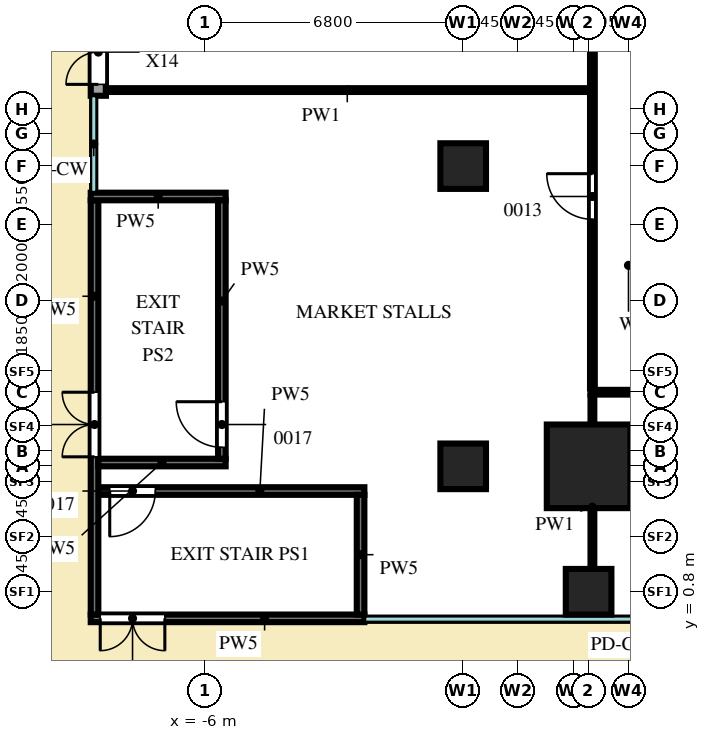
"""IFC4 building model, lengths in metres.
Left out: names, types, materials, properties, quantities, classifications, styles, units other than length and angle.
Written with IfcOpenShell. Run it as: python <this file> out.ifc"""

import sys

from ifc_helpers import new_model, si_unit, direction, frame, frame_2d, origin, origin_2d, place, context, subcontext, project, spatial, rectangle, extrude, source, transform, mapped, element, fill, save


model = new_model("IFC4")
c1 = context("Model", 3, precision=1e-05, world=origin(), true_north=direction((0.0, 1.0)))
c2 = subcontext(c1, "Body", "Model", "MODEL_VIEW")
j1 = project(units=[si_unit("LENGTHUNIT", "METRE"), si_unit("PLANEANGLEUNIT", "RADIAN")], contexts=[c1])
p1 = place(None, origin())
s1 = spatial("IfcSite", under=j1, at=p1, CompositionType="ELEMENT")
p2 = place(p1, origin())
s2 = spatial("IfcBuilding", under=s1, at=p2, CompositionType="ELEMENT")
p3 = place(p2, origin())
s3 = spatial("IfcBuildingStorey", under=s2, at=p3, CompositionType="ELEMENT", Elevation=0.0)
m1 = source(origin(), c2, "Body", "SweptSolid", [
    extrude(rectangle(XDim=2.2, YDim=2.2, at=origin_2d()), origin(), (0.0, 0.0, 1.0), 7.2),
])
p4 = place(p3, frame((4.1, 4.1, 0.0), z_axis=(0.0, 0.0, 1.0), x_axis=(1.0, 0.0, 0.0)))
e1 = element("IfcColumn", 1, at=p4, inside=s3, PredefinedType="COLUMN", context=c2, shape_type="MappedRepresentation", body=[
    mapped(m1, transform((0.0, 0.0, 0.0))),
])
m2 = source(origin(), c2, "Body", "SweptSolid", [
    extrude(rectangle(XDim=1.2, YDim=1.2, at=origin_2d()), origin(), (0.0, 0.0, 1.0), 7.2),
])
for number, where, z_axis, x_axis in (
    (2, (4.1, 0.8, 0.0), (0.0, 0.0, 1.0), (1.0, 0.0, 0.0)),
    (3, (0.8, 4.1, 0.0), (0.0, 0.0, 1.0), (1.0, 0.0, 0.0)),
    (4, (0.8, 12.0, 0.0), (0.0, 0.0, 1.0), (1.0, 0.0, 0.0)),
):
    element("IfcColumn", number, at=place(p3, frame(where, z_axis=z_axis, x_axis=x_axis)), inside=s3, PredefinedType="COLUMN", context=c2, shape_type="MappedRepresentation", body=[
        mapped(m2, transform((0.0, 0.0, 0.0))),
    ])
m3 = source(origin(), c2, "Body", "SweptSolid", [
    extrude(rectangle(XDim=2.3, YDim=0.4, at=frame_2d((1.15, 0.0))), origin(), (0.0, 0.0, 1.0), 7.15),
])
p5 = place(p3, frame((-8.8, 16.15, 0.0), z_axis=(0.0, 0.0, 1.0), x_axis=(0.0, -1.0, 0.0)))
e5 = element("IfcWall", 5, at=p5, inside=s3, PredefinedType="SOLIDWALL", context=c2, shape_type="MappedRepresentation", body=[
    mapped(m3, transform((0.0, 0.0, 0.0))),
])
m4 = source(origin(), c2, "Body", "SweptSolid", [
    extrude(rectangle(XDim=1.7, YDim=2.4, at=frame_2d((0.85, 1.2))), frame((0.0, 0.21, 0.0), z_axis=(0.0, -1.0, 0.0), x_axis=(1.0, 0.0, 0.0)), (0.0, 0.0, 1.0), 0.42),
])
p6 = place(p5, frame((2.0, 0.0, 0.0), z_axis=(0.0, 0.0, 1.0), x_axis=(-1.0, 0.0, 0.0)))
e6 = element("IfcOpeningElement", 6, at=p6, cuts=e5, PredefinedType="OPENING", context=c2, shape_type="MappedRepresentation", body=[
    mapped(m4, transform((0.0, 0.0, 0.0))),
])
m5 = source(origin(), c2, "Body", "SweptSolid", [
    extrude(rectangle(XDim=7.2, YDim=0.2, at=frame_2d((3.6, 0.0))), origin(), (0.0, 0.0, 1.0), 7.2),
])
p7 = place(p3, frame((-9.0, 0.1, 0.0), z_axis=(0.0, 0.0, 1.0), x_axis=(1.0, 0.0, 0.0)))
e7 = element("IfcWall", 7, at=p7, inside=s3, PredefinedType="PARTITIONING", context=c2, shape_type="MappedRepresentation", body=[
    mapped(m5, transform((0.0, 0.0, 0.0))),
])
m6 = source(origin(), c2, "Body", "SweptSolid", [
    extrude(rectangle(XDim=1.7, YDim=2.4, at=frame_2d((0.85, 1.2))), frame((0.0, 0.11, 0.0), z_axis=(0.0, -1.0, 0.0), x_axis=(1.0, 0.0, 0.0)), (0.0, 0.0, 1.0), 0.22),
])
p8 = place(p7, frame((1.95, 0.0, 0.0), z_axis=(0.0, 0.0, 1.0), x_axis=(-1.0, 0.0, 0.0)))
e8 = element("IfcOpeningElement", 8, at=p8, cuts=e7, PredefinedType="OPENING", context=c2, shape_type="MappedRepresentation", body=[
    mapped(m6, transform((0.0, 0.0, 0.0))),
])
m7 = source(origin(), c2, "Body", "SweptSolid", [
    extrude(rectangle(XDim=7.0, YDim=0.2, at=frame_2d((3.5, 0.0))), origin(), (0.0, 0.0, 1.0), 7.2),
])
p9 = place(p3, frame((-8.8, 3.45, 0.0), z_axis=(0.0, 0.0, 1.0), x_axis=(1.0, 0.0, 0.0)))
e9 = element("IfcWall", 9, at=p9, inside=s3, PredefinedType="PARTITIONING", context=c2, shape_type="MappedRepresentation", body=[
    mapped(m7, transform((0.0, 0.0, 0.0))),
])
m8 = source(origin(), c2, "Body", "SweptSolid", [
    extrude(rectangle(XDim=1.2, YDim=2.1, at=frame_2d((0.6, 1.05))), frame((0.0, 0.11, 0.0), z_axis=(0.0, -1.0, 0.0), x_axis=(1.0, 0.0, 0.0)), (0.0, 0.0, 1.0), 0.22),
])
p10 = place(p9, frame((0.3, 0.0, 0.0)))
e10 = element("IfcOpeningElement", 10, at=p10, cuts=e9, PredefinedType="OPENING", context=c2, shape_type="MappedRepresentation", body=[
    mapped(m8, transform((0.0, 0.0, 0.0))),
])
m9 = source(origin(), c2, "Body", "SweptSolid", [
    extrude(rectangle(XDim=10.9, YDim=0.2, at=frame_2d((5.45, 0.0))), origin(), (0.0, 0.0, 1.0), 7.2),
])
p11 = place(p3, frame((-8.9, 0.2, 0.0), z_axis=(0.0, 0.0, 1.0), x_axis=(0.0, 1.0, 0.0)))
e11 = element("IfcWall", 11, at=p11, inside=s3, PredefinedType="PARTITIONING", context=c2, shape_type="MappedRepresentation", body=[
    mapped(m9, transform((0.0, 0.0, 0.0))),
])
p12 = place(p11, frame((4.15, 0.0, 0.0)))
e12 = element("IfcOpeningElement", 12, at=p12, cuts=e11, PredefinedType="OPENING", context=c2, shape_type="MappedRepresentation", body=[
    mapped(m6, transform((0.0, 0.0, 0.0))),
])
m10 = source(origin(), c2, "Body", "SweptSolid", [
    extrude(rectangle(XDim=3.15, YDim=0.2, at=frame_2d((1.575, 0.0))), origin(), (0.0, 0.0, 1.0), 7.2),
])
p13 = place(p3, frame((-1.9, 0.2, 0.0), z_axis=(0.0, 0.0, 1.0), x_axis=(0.0, 1.0, 0.0)))
e13 = element("IfcWall", 13, at=p13, inside=s3, PredefinedType="PARTITIONING", context=c2, shape_type="MappedRepresentation", body=[
    mapped(m10, transform((0.0, 0.0, 0.0))),
])
m11 = source(origin(), c2, "Body", "SweptSolid", [
    extrude(rectangle(XDim=3.35, YDim=0.2, at=frame_2d((1.675, 0.0))), origin(), (0.0, 0.0, 1.0), 7.2),
])
p14 = place(p3, frame((-8.8, 4.2, 0.0), z_axis=(0.0, 0.0, 1.0), x_axis=(1.0, 0.0, 0.0)))
e14 = element("IfcWall", 14, at=p14, inside=s3, PredefinedType="PARTITIONING", context=c2, shape_type="MappedRepresentation", body=[
    mapped(m11, transform((0.0, 0.0, 0.0))),
])
m12 = source(origin(), c2, "Body", "SweptSolid", [
    extrude(rectangle(XDim=3.55, YDim=0.2, at=frame_2d((1.775, 0.0))), origin(), (0.0, 0.0, 1.0), 7.2),
])
p15 = place(p3, frame((-9.0, 11.2, 0.0), z_axis=(0.0, 0.0, 1.0), x_axis=(1.0, 0.0, 0.0)))
e15 = element("IfcWall", 15, at=p15, inside=s3, PredefinedType="PARTITIONING", context=c2, shape_type="MappedRepresentation", body=[
    mapped(m12, transform((0.0, 0.0, 0.0))),
])
m13 = source(origin(), c2, "Body", "SweptSolid", [
    extrude(rectangle(XDim=6.8, YDim=0.2, at=frame_2d((3.4, 0.0))), origin(), (0.0, 0.0, 1.0), 7.2),
])
p16 = place(p3, frame((-5.55, 4.3, 0.0), z_axis=(0.0, 0.0, 1.0), x_axis=(0.0, 1.0, 0.0)))
e16 = element("IfcWall", 16, at=p16, inside=s3, PredefinedType="PARTITIONING", context=c2, shape_type="MappedRepresentation", body=[
    mapped(m13, transform((0.0, 0.0, 0.0))),
])
p17 = place(p16, frame((0.3, 0.0, 0.0)))
e17 = element("IfcOpeningElement", 17, at=p17, cuts=e16, PredefinedType="OPENING", context=c2, shape_type="MappedRepresentation", body=[
    mapped(m8, transform((0.0, 0.0, 0.0))),
])
m14 = source(origin(), c2, "Body", "SweptSolid", [
    extrude(rectangle(XDim=5.85, YDim=0.1, at=frame_2d((2.925, 0.0))), origin(), (0.0, 0.0, 1.0), 7.2),
])
p18 = place(p3, frame((4.2, 0.1, 0.0), z_axis=(0.0, 0.0, 1.0), x_axis=(0.0, 1.0, 0.0)))
e18 = element("IfcWall", 18, at=p18, inside=s3, PredefinedType="PARTITIONING", context=c2, shape_type="MappedRepresentation", body=[
    mapped(m14, transform((0.0, 0.0, 0.0))),
])
m15 = source(origin(), c2, "Body", "SweptSolid", [
    extrude(rectangle(XDim=9.55, YDim=0.125, at=frame_2d((4.775, 0.0))), origin(), (0.0, 0.0, 1.0), 7.2),
])
p19 = place(p3, frame((4.15, 6.05, 0.0), z_axis=(0.0, 0.0, 1.0), x_axis=(1.0, 0.0, 0.0)))
e19 = element("IfcWall", 19, at=p19, inside=s3, PredefinedType="PARTITIONING", context=c2, shape_type="MappedRepresentation", body=[
    mapped(m15, transform((0.0, 0.0, 0.0))),
])
m16 = source(origin(), c2, "Body", "SweptSolid", [
    extrude(rectangle(XDim=0.9, YDim=2.1, at=frame_2d((0.45, 1.05))), frame((0.0, 0.073, 0.0), z_axis=(0.0, -1.0, 0.0), x_axis=(1.0, 0.0, 0.0)), (0.0, 0.0, 1.0), 0.145),
])
p20 = place(p19, frame((4.25, 0.0, 0.0)))
e20 = element("IfcOpeningElement", 20, at=p20, cuts=e19, PredefinedType="OPENING", context=c2, shape_type="MappedRepresentation", body=[
    mapped(m16, transform((0.0, 0.0, 0.0))),
])
m17 = source(origin(), c2, "Body", "SweptSolid", [
    extrude(rectangle(XDim=41.8, YDim=0.125, at=frame_2d((20.9, 0.0))), origin(), (0.0, 0.0, 1.0), 7.2),
])
p21 = place(p3, frame((4.2, 6.15, 0.0), z_axis=(0.0, 0.0, 1.0), x_axis=(0.0, 1.0, 0.0)))
e21 = element("IfcWall", 21, at=p21, inside=s3, PredefinedType="PARTITIONING", context=c2, shape_type="MappedRepresentation", body=[
    mapped(m17, transform((0.0, 0.0, 0.0))),
])
m18 = source(origin(), c2, "Body", "SweptSolid", [
    extrude(rectangle(XDim=1.2, YDim=2.1, at=frame_2d((0.6, 1.05))), frame((0.0, 0.073, 0.0), z_axis=(0.0, -1.0, 0.0), x_axis=(1.0, 0.0, 0.0)), (0.0, 0.0, 1.0), 0.145),
])
p22 = place(p21, frame((4.45, 0.0, 0.0)))
e22 = element("IfcOpeningElement", 22, at=p22, cuts=e21, PredefinedType="OPENING", context=c2, shape_type="MappedRepresentation", body=[
    mapped(m18, transform((0.0, 0.0, 0.0))),
])
p23 = place(p21, frame((10.25, 0.0, 0.0)))
e23 = element("IfcOpeningElement", 23, at=p23, cuts=e21, PredefinedType="OPENING", context=c2, shape_type="MappedRepresentation", body=[
    mapped(m16, transform((0.0, 0.0, 0.0))),
])
p24 = place(p21, frame((20.25, 0.0, 0.0)))
e24 = element("IfcOpeningElement", 24, at=p24, cuts=e21, PredefinedType="OPENING", context=c2, shape_type="MappedRepresentation", body=[
    mapped(m18, transform((0.0, 0.0, 0.0))),
])
p25 = place(p21, frame((31.25, 0.0, 0.0)))
e25 = element("IfcOpeningElement", 25, at=p25, cuts=e21, PredefinedType="OPENING", context=c2, shape_type="MappedRepresentation", body=[
    mapped(m16, transform((0.0, 0.0, 0.0))),
])
p26 = place(p21, frame((37.05, 0.0, 0.0)))
e26 = element("IfcOpeningElement", 26, at=p26, cuts=e21, PredefinedType="OPENING", context=c2, shape_type="MappedRepresentation", body=[
    mapped(m18, transform((0.0, 0.0, 0.0))),
])
m19 = source(origin(), c2, "Body", "SweptSolid", [
    extrude(rectangle(XDim=12.7, YDim=0.1, at=frame_2d((6.35, 0.0))), origin(), (0.0, 0.0, 1.0), 7.2),
])
p27 = place(p3, frame((-8.6, 14.0, 0.0), z_axis=(0.0, 0.0, 1.0), x_axis=(1.0, 0.0, 0.0)))
e27 = element("IfcWall", 27, at=p27, inside=s3, PredefinedType="PARTITIONING", context=c2, shape_type="MappedRepresentation", body=[
    mapped(m19, transform((0.0, 0.0, 0.0))),
])
m20 = source(origin(), c2, "Body", "SweptSolid", [
    extrude(rectangle(XDim=1.7, YDim=2.4, at=frame_2d((0.85, 1.2))), frame((0.0, 0.025, 0.0), z_axis=(0.0, -1.0, 0.0), x_axis=(1.0, 0.0, 0.0)), (0.0, 0.0, 1.0), 0.05),
])
p28 = place(p6, origin())
e28 = element("IfcDoor", 28, at=p28, inside=s3, OperationType="DOUBLE_DOOR_SINGLE_SWING", PredefinedType="DOOR", context=c2, shape_type="MappedRepresentation", body=[
    mapped(m20, transform((0.0, 0.0, 0.0))),
])
fill(e6, e28)
m21 = source(origin(), c2, "Body", "SweptSolid", [
    extrude(rectangle(XDim=1.2, YDim=2.1, at=frame_2d((0.6, 1.05))), frame((0.0, 0.025, 0.0), z_axis=(0.0, -1.0, 0.0), x_axis=(1.0, 0.0, 0.0)), (0.0, 0.0, 1.0), 0.05),
])
p29 = place(p22, origin())
e29 = element("IfcDoor", 29, at=p29, inside=s3, OperationType="SINGLE_SWING_LEFT", PredefinedType="DOOR", context=c2, shape_type="MappedRepresentation", body=[
    mapped(m21, transform((0.0, 0.0, 0.0))),
])
fill(e22, e29)
p30 = place(p10, origin())
e30 = element("IfcDoor", 30, at=p30, inside=s3, OperationType="SINGLE_SWING_LEFT", PredefinedType="DOOR", context=c2, shape_type="MappedRepresentation", body=[
    mapped(m21, transform((0.0, 0.0, 0.0))),
])
fill(e10, e30)
p31 = place(p17, origin())
e31 = element("IfcDoor", 31, at=p31, inside=s3, OperationType="SINGLE_SWING_LEFT", PredefinedType="DOOR", context=c2, shape_type="MappedRepresentation", body=[
    mapped(m21, transform((0.0, 0.0, 0.0))),
])
fill(e17, e31)
p32 = place(p8, origin())
e32 = element("IfcDoor", 32, at=p32, inside=s3, OperationType="DOUBLE_DOOR_SINGLE_SWING", PredefinedType="DOOR", context=c2, shape_type="MappedRepresentation", body=[
    mapped(m20, transform((0.0, 0.0, 0.0))),
])
fill(e8, e32)
p33 = place(p12, origin())
e33 = element("IfcDoor", 33, at=p33, inside=s3, OperationType="DOUBLE_DOOR_SINGLE_SWING", PredefinedType="DOOR", context=c2, shape_type="MappedRepresentation", body=[
    mapped(m20, transform((0.0, 0.0, 0.0))),
])
fill(e12, e33)
save(model, sys.argv[1])
